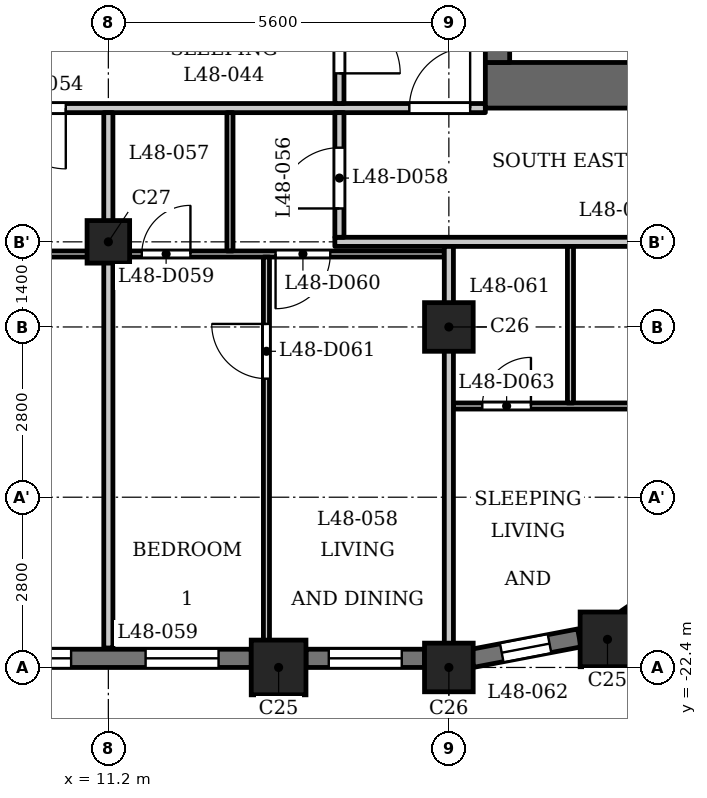
"""IFC4 building model, lengths in metres.
Left out: names, types, materials, properties, quantities, classifications, styles, units other than length and angle.
Written with IfcOpenShell. Run it as: python <this file> out.ifc"""

import sys

from ifc_helpers import new_model, si_unit, direction, frame, frame_2d, origin, origin_2d, place, context, subcontext, project, spatial, rectangle, extrude, element, fill, save


model = new_model("IFC4")
c1 = context("Model", 3, precision=1e-05, world=origin(), true_north=direction((0.0, 1.0)))
c2 = subcontext(c1, "Body", "Model", "MODEL_VIEW")
j1 = project(units=[si_unit("LENGTHUNIT", "METRE"), si_unit("PLANEANGLEUNIT", "RADIAN")], contexts=[c1])
p1 = place(None, origin())
s1 = spatial("IfcSite", under=j1, at=p1, CompositionType="ELEMENT")
p2 = place(p1, origin())
s2 = spatial("IfcBuilding", under=s1, at=p2, CompositionType="ELEMENT")
p3 = place(p2, frame((0.0, 0.0, 188.9)))
s3 = spatial("IfcBuildingStorey", under=s2, at=p3, CompositionType="ELEMENT", Elevation=188.9)
for number, where, z_axis, x_axis in (
    (1, (14.0, -22.4, 0.0), (0.0, 0.0, 1.0), (1.0, 0.0, 0.0)),
    (2, (19.409, -21.938, 0.0), (0.0, 0.0, 1.0), (1.0, 0.0, 0.0)),
):
    element("IfcColumn", number, at=place(p3, frame(where, z_axis=z_axis, x_axis=x_axis)), inside=s3, PredefinedType="COLUMN", context=c2, shape_type="SweptSolid", body=[
        extrude(rectangle(XDim=0.9, YDim=0.9, at=origin_2d()), origin(), (0.0, 0.0, 1.0), 3.5),
    ])
for number, where, z_axis, x_axis in (
    (3, (16.8, -22.4, 0.0), (0.0, 0.0, 1.0), (1.0, 0.0, 0.0)),
    (4, (16.8, -16.8, 0.0), (0.0, 0.0, 1.0), (1.0, 0.0, 0.0)),
):
    element("IfcColumn", number, at=place(p3, frame(where, z_axis=z_axis, x_axis=x_axis)), inside=s3, PredefinedType="COLUMN", context=c2, shape_type="SweptSolid", body=[
        extrude(rectangle(XDim=0.8, YDim=0.8, at=origin_2d()), origin(), (0.0, 0.0, 1.0), 3.5),
    ])
p4 = place(p3, frame((11.2, -15.4, 0.0), z_axis=(0.0, 0.0, 1.0), x_axis=(1.0, 0.0, 0.0)))
e5 = element("IfcColumn", 5, at=p4, inside=s3, PredefinedType="COLUMN", context=c2, shape_type="SweptSolid", body=[
    extrude(rectangle(XDim=0.7, YDim=0.7, at=origin_2d()), origin(), (0.0, 0.0, 1.0), 3.5),
])
p5 = place(p3, frame((8.85, -22.25, 0.0), z_axis=(0.0, 0.0, 1.0), x_axis=(1.0, 0.0, 0.0)))
e6 = element("IfcWall", 6, at=p5, inside=s3, PredefinedType="SOLIDWALL", context=c2, shape_type="SweptSolid", body=[
    extrude(rectangle(XDim=4.7, YDim=0.3, at=frame_2d((2.35, 0.0))), origin(), (0.0, 0.0, 1.0), 2.5),
])
p6 = place(p5, frame((0.538, 0.0, 0.6)))
e7 = element("IfcOpeningElement", 7, at=p6, cuts=e6, PredefinedType="OPENING", context=c2, shape_type="SweptSolid", body=[
    extrude(rectangle(XDim=1.2, YDim=1.55, at=frame_2d((0.6, 0.775))), frame((0.0, 0.16, 0.0), z_axis=(0.0, -1.0, 0.0), x_axis=(1.0, 0.0, 0.0)), (0.0, 0.0, 1.0), 0.32),
])
p7 = place(p5, frame((2.962, 0.0, 0.6)))
e8 = element("IfcOpeningElement", 8, at=p7, cuts=e6, PredefinedType="OPENING", context=c2, shape_type="SweptSolid", body=[
    extrude(rectangle(XDim=1.2, YDim=1.55, at=frame_2d((0.6, 0.775))), frame((0.0, 0.16, 0.0), z_axis=(0.0, -1.0, 0.0), x_axis=(1.0, 0.0, 0.0)), (0.0, 0.0, 1.0), 0.32),
])
p8 = place(p3, frame((14.45, -22.25, 0.0), z_axis=(0.0, 0.0, 1.0), x_axis=(1.0, 0.0, 0.0)))
e9 = element("IfcWall", 9, at=p8, inside=s3, PredefinedType="SOLIDWALL", context=c2, shape_type="SweptSolid", body=[
    extrude(rectangle(XDim=1.95, YDim=0.3, at=frame_2d((0.975, 0.0))), origin(), (0.0, 0.0, 1.0), 2.5),
])
p9 = place(p8, frame((0.375, 0.0, 0.6)))
e10 = element("IfcOpeningElement", 10, at=p9, cuts=e9, PredefinedType="OPENING", context=c2, shape_type="SweptSolid", body=[
    extrude(rectangle(XDim=1.2, YDim=1.55, at=frame_2d((0.6, 0.775))), frame((0.0, 0.16, 0.0), z_axis=(0.0, -1.0, 0.0), x_axis=(1.0, 0.0, 0.0)), (0.0, 0.0, 1.0), 0.32),
])
p10 = place(p3, frame((17.179, -22.251, 0.0), z_axis=(0.0, 0.0, 1.0), x_axis=(0.98230529033, 0.187286722942, 0.0)))
e11 = element("IfcWall", 11, at=p10, inside=s3, PredefinedType="SOLIDWALL", context=c2, shape_type="SweptSolid", body=[
    extrude(rectangle(XDim=1.799, YDim=0.3, at=frame_2d((0.899, 0.0))), origin(), (0.0, 0.0, 1.0), 2.5),
])
p11 = place(p10, frame((0.5, 0.0, 0.6)))
e12 = element("IfcOpeningElement", 12, at=p11, cuts=e11, PredefinedType="OPENING", context=c2, shape_type="SweptSolid", body=[
    extrude(rectangle(XDim=0.8, YDim=1.55, at=frame_2d((0.4, 0.775))), frame((0.0, 0.16, 0.0), z_axis=(0.0, -1.0, 0.0), x_axis=(1.0, 0.0, 0.0)), (0.0, 0.0, 1.0), 0.32),
])
p12 = place(p3, frame((19.719, -21.594, 0.0), z_axis=(0.0, 0.0, 1.0), x_axis=(0.827067282455, 0.562102935673, 0.0)))
e13 = element("IfcWall", 13, at=p12, inside=s3, PredefinedType="SOLIDWALL", context=c2, shape_type="SweptSolid", body=[
    extrude(rectangle(XDim=1.806, YDim=0.3, at=frame_2d((0.903, 0.0))), origin(), (0.0, 0.0, 1.0), 2.5),
])
p13 = place(p12, frame((0.503, 0.0, 0.6)))
e14 = element("IfcOpeningElement", 14, at=p13, cuts=e13, PredefinedType="OPENING", context=c2, shape_type="SweptSolid", body=[
    extrude(rectangle(XDim=0.8, YDim=1.55, at=frame_2d((0.4, 0.775))), frame((0.0, 0.16, 0.0), z_axis=(0.0, -1.0, 0.0), x_axis=(1.0, 0.0, 0.0)), (0.0, 0.0, 1.0), 0.32),
])
p14 = place(p3, frame((17.4, -12.825, 0.0), z_axis=(0.0, 0.0, 1.0), x_axis=(1.0, 0.0, 0.0)))
e15 = element("IfcWall", 15, at=p14, inside=s3, PredefinedType="SHEAR", context=c2, shape_type="SweptSolid", body=[
    extrude(rectangle(XDim=7.6, YDim=0.75, at=frame_2d((3.8, 0.0))), origin(), (0.0, 0.0, 1.0), 3.2),
])
p15 = place(p3, frame((17.6, -12.45, 0.0), z_axis=(0.0, 0.0, 1.0), x_axis=(0.0, 1.0, 0.0)))
e16 = element("IfcWall", 16, at=p15, inside=s3, PredefinedType="SHEAR", context=c2, shape_type="SweptSolid", body=[
    extrude(rectangle(XDim=24.9, YDim=0.4, at=frame_2d((12.45, 0.0))), origin(), (0.0, 0.0, 1.0), 3.2),
])
p16 = place(p15, frame((6.325, 0.0, 0.0)))
e17 = element("IfcOpeningElement", 17, at=p16, cuts=e16, PredefinedType="OPENING", context=c2, shape_type="SweptSolid", body=[
    extrude(rectangle(XDim=0.9, YDim=2.1, at=frame_2d((0.45, 1.05))), frame((0.0, 0.21, 0.0), z_axis=(0.0, -1.0, 0.0), x_axis=(1.0, 0.0, 0.0)), (0.0, 0.0, 1.0), 0.42),
])
p17 = place(p15, frame((9.925, 0.0, 0.0)))
e18 = element("IfcOpeningElement", 18, at=p17, cuts=e16, PredefinedType="OPENING", context=c2, shape_type="SweptSolid", body=[
    extrude(rectangle(XDim=0.9, YDim=2.1, at=frame_2d((0.45, 1.05))), frame((0.0, 0.21, 0.0), z_axis=(0.0, -1.0, 0.0), x_axis=(1.0, 0.0, 0.0)), (0.0, 0.0, 1.0), 0.42),
])
p18 = place(p15, frame((15.6, 0.0, 0.0)))
e19 = element("IfcOpeningElement", 19, at=p18, cuts=e16, PredefinedType="OPENING", context=c2, shape_type="SweptSolid", body=[
    extrude(rectangle(XDim=1.1, YDim=2.1, at=frame_2d((0.55, 1.05))), frame((0.0, 0.21, 0.0), z_axis=(0.0, -1.0, 0.0), x_axis=(1.0, 0.0, 0.0)), (0.0, 0.0, 1.0), 0.42),
])
p19 = place(p15, frame((18.0, 0.0, 0.0)))
e20 = element("IfcOpeningElement", 20, at=p19, cuts=e16, PredefinedType="OPENING", context=c2, shape_type="SweptSolid", body=[
    extrude(rectangle(XDim=1.1, YDim=2.1, at=frame_2d((0.55, 1.05))), frame((0.0, 0.21, 0.0), z_axis=(0.0, -1.0, 0.0), x_axis=(1.0, 0.0, 0.0)), (0.0, 0.0, 1.0), 0.42),
])
p20 = place(p15, frame((23.025, 0.0, 0.0)))
e21 = element("IfcOpeningElement", 21, at=p20, cuts=e16, PredefinedType="OPENING", context=c2, shape_type="SweptSolid", body=[
    extrude(rectangle(XDim=1.1, YDim=2.1, at=frame_2d((0.55, 1.05))), frame((0.0, 0.21, 0.0), z_axis=(0.0, -1.0, 0.0), x_axis=(1.0, 0.0, 0.0)), (0.0, 0.0, 1.0), 0.42),
])
p21 = place(p15, frame((0.775, 0.0, 0.0)))
e22 = element("IfcOpeningElement", 22, at=p21, cuts=e16, PredefinedType="OPENING", context=c2, shape_type="SweptSolid", body=[
    extrude(rectangle(XDim=1.1, YDim=2.1, at=frame_2d((0.55, 1.05))), frame((0.0, 0.21, 0.0), z_axis=(0.0, -1.0, 0.0), x_axis=(1.0, 0.0, 0.0)), (0.0, 0.0, 1.0), 0.42),
])
p22 = place(p15, frame((12.925, 0.0, 0.0)))
e23 = element("IfcOpeningElement", 23, at=p22, cuts=e16, PredefinedType="OPENING", context=c2, shape_type="SweptSolid", body=[
    extrude(rectangle(XDim=1.8, YDim=2.1, at=frame_2d((0.9, 1.05))), frame((0.0, 0.21, 0.0), z_axis=(0.0, -1.0, 0.0), x_axis=(1.0, 0.0, 0.0)), (0.0, 0.0, 1.0), 0.42),
])
p23 = place(p3, frame((16.875, -18.1, 0.0), z_axis=(0.0, 0.0, 1.0), x_axis=(1.0, 0.0, 0.0)))
e24 = element("IfcWall", 24, at=p23, inside=s3, PredefinedType="PARTITIONING", context=c2, shape_type="SweptSolid", body=[
    extrude(rectangle(XDim=6.765, YDim=0.1, at=frame_2d((3.382, 0.0))), origin(), (0.0, 0.0, 1.0), 3.2),
])
p24 = place(p23, frame((0.475, 0.0, 0.0)))
e25 = element("IfcOpeningElement", 25, at=p24, cuts=e24, PredefinedType="OPENING", context=c2, shape_type="SweptSolid", body=[
    extrude(rectangle(XDim=0.8, YDim=2.1, at=frame_2d((0.4, 1.05))), frame((0.0, 0.06, 0.0), z_axis=(0.0, -1.0, 0.0), x_axis=(1.0, 0.0, 0.0)), (0.0, 0.0, 1.0), 0.12),
])
p25 = place(p23, frame((4.575, 0.0, 0.0)))
e26 = element("IfcOpeningElement", 26, at=p25, cuts=e24, PredefinedType="OPENING", context=c2, shape_type="SweptSolid", body=[
    extrude(rectangle(XDim=0.9, YDim=2.1, at=frame_2d((0.45, 1.05))), frame((0.0, 0.06, 0.0), z_axis=(0.0, -1.0, 0.0), x_axis=(1.0, 0.0, 0.0)), (0.0, 0.0, 1.0), 0.12),
])
p26 = place(p3, frame((-16.725, -15.6, 0.0), z_axis=(0.0, 0.0, 1.0), x_axis=(1.0, 0.0, 0.0)))
e27 = element("IfcWall", 27, at=p26, inside=s3, PredefinedType="PARTITIONING", context=c2, shape_type="SweptSolid", body=[
    extrude(rectangle(XDim=33.45, YDim=0.1, at=frame_2d((16.725, 0.0))), origin(), (0.0, 0.0, 1.0), 3.2),
])
p27 = place(p26, frame((4.075, 0.0, 0.0)))
e28 = element("IfcOpeningElement", 28, at=p27, cuts=e27, PredefinedType="OPENING", context=c2, shape_type="SweptSolid", body=[
    extrude(rectangle(XDim=0.8, YDim=2.1, at=frame_2d((0.4, 1.05))), frame((0.0, 0.06, 0.0), z_axis=(0.0, -1.0, 0.0), x_axis=(1.0, 0.0, 0.0)), (0.0, 0.0, 1.0), 0.12),
])
p28 = place(p26, frame((1.825, 0.0, 0.0)))
e29 = element("IfcOpeningElement", 29, at=p28, cuts=e27, PredefinedType="OPENING", context=c2, shape_type="SweptSolid", body=[
    extrude(rectangle(XDim=0.9, YDim=2.1, at=frame_2d((0.45, 1.05))), frame((0.0, 0.06, 0.0), z_axis=(0.0, -1.0, 0.0), x_axis=(1.0, 0.0, 0.0)), (0.0, 0.0, 1.0), 0.12),
])
p29 = place(p26, frame((9.675, 0.0, 0.0)))
e30 = element("IfcOpeningElement", 30, at=p29, cuts=e27, PredefinedType="OPENING", context=c2, shape_type="SweptSolid", body=[
    extrude(rectangle(XDim=0.8, YDim=2.1, at=frame_2d((0.4, 1.05))), frame((0.0, 0.06, 0.0), z_axis=(0.0, -1.0, 0.0), x_axis=(1.0, 0.0, 0.0)), (0.0, 0.0, 1.0), 0.12),
])
p30 = place(p26, frame((14.025, 0.0, 0.0)))
e31 = element("IfcOpeningElement", 31, at=p30, cuts=e27, PredefinedType="OPENING", context=c2, shape_type="SweptSolid", body=[
    extrude(rectangle(XDim=0.9, YDim=2.1, at=frame_2d((0.45, 1.05))), frame((0.0, 0.06, 0.0), z_axis=(0.0, -1.0, 0.0), x_axis=(1.0, 0.0, 0.0)), (0.0, 0.0, 1.0), 0.12),
])
p31 = place(p26, frame((20.875, 0.0, 0.0)))
e32 = element("IfcOpeningElement", 32, at=p31, cuts=e27, PredefinedType="OPENING", context=c2, shape_type="SweptSolid", body=[
    extrude(rectangle(XDim=0.8, YDim=2.1, at=frame_2d((0.4, 1.05))), frame((0.0, 0.06, 0.0), z_axis=(0.0, -1.0, 0.0), x_axis=(1.0, 0.0, 0.0)), (0.0, 0.0, 1.0), 0.12),
])
p32 = place(p26, frame((25.225, 0.0, 0.0)))
e33 = element("IfcOpeningElement", 33, at=p32, cuts=e27, PredefinedType="OPENING", context=c2, shape_type="SweptSolid", body=[
    extrude(rectangle(XDim=0.9, YDim=2.1, at=frame_2d((0.45, 1.05))), frame((0.0, 0.06, 0.0), z_axis=(0.0, -1.0, 0.0), x_axis=(1.0, 0.0, 0.0)), (0.0, 0.0, 1.0), 0.12),
])
p33 = place(p26, frame((28.475, 0.0, 0.0)))
e34 = element("IfcOpeningElement", 34, at=p33, cuts=e27, PredefinedType="OPENING", context=c2, shape_type="SweptSolid", body=[
    extrude(rectangle(XDim=0.8, YDim=2.1, at=frame_2d((0.4, 1.05))), frame((0.0, 0.06, 0.0), z_axis=(0.0, -1.0, 0.0), x_axis=(1.0, 0.0, 0.0)), (0.0, 0.0, 1.0), 0.12),
])
p34 = place(p26, frame((30.675, 0.0, 0.0)))
e35 = element("IfcOpeningElement", 35, at=p34, cuts=e27, PredefinedType="OPENING", context=c2, shape_type="SweptSolid", body=[
    extrude(rectangle(XDim=0.9, YDim=2.1, at=frame_2d((0.45, 1.05))), frame((0.0, 0.06, 0.0), z_axis=(0.0, -1.0, 0.0), x_axis=(1.0, 0.0, 0.0)), (0.0, 0.0, 1.0), 0.12),
])
p35 = place(p3, frame((14.925, -15.4, 0.0), z_axis=(0.0, 0.0, 1.0), x_axis=(1.0, 0.0, 0.0)))
e36 = element("IfcWall", 36, at=p35, inside=s3, PredefinedType="PARTITIONING", context=c2, shape_type="SweptSolid", body=[
    extrude(rectangle(XDim=9.759, YDim=0.15, at=frame_2d((4.879, 0.0))), origin(), (0.0, 0.0, 1.0), 3.2),
])
p36 = place(p35, frame((7.775, 0.0, 0.0)))
e37 = element("IfcOpeningElement", 37, at=p36, cuts=e36, PredefinedType="OPENING", context=c2, shape_type="SweptSolid", body=[
    extrude(rectangle(XDim=1.0, YDim=2.1, at=frame_2d((0.5, 1.05))), frame((0.0, 0.085, 0.0), z_axis=(0.0, -1.0, 0.0), x_axis=(1.0, 0.0, 0.0)), (0.0, 0.0, 1.0), 0.17),
])
p37 = place(p3, frame((-17.4, -13.2, 0.0), z_axis=(0.0, 0.0, 1.0), x_axis=(1.0, 0.0, 0.0)))
e38 = element("IfcWall", 38, at=p37, inside=s3, PredefinedType="PARTITIONING", context=c2, shape_type="SweptSolid", body=[
    extrude(rectangle(XDim=34.8, YDim=0.15, at=frame_2d((17.4, 0.0))), origin(), (0.0, 0.0, 1.0), 3.2),
])
p38 = place(p37, frame((0.15, 0.0, 0.0)))
e39 = element("IfcOpeningElement", 39, at=p38, cuts=e38, PredefinedType="OPENING", context=c2, shape_type="SweptSolid", body=[
    extrude(rectangle(XDim=1.0, YDim=2.1, at=frame_2d((0.5, 1.05))), frame((0.0, 0.085, 0.0), z_axis=(0.0, -1.0, 0.0), x_axis=(1.0, 0.0, 0.0)), (0.0, 0.0, 1.0), 0.17),
])
p39 = place(p37, frame((33.55, 0.0, 0.0)))
e40 = element("IfcOpeningElement", 40, at=p39, cuts=e38, PredefinedType="OPENING", context=c2, shape_type="SweptSolid", body=[
    extrude(rectangle(XDim=1.0, YDim=2.1, at=frame_2d((0.5, 1.05))), frame((0.0, 0.085, 0.0), z_axis=(0.0, -1.0, 0.0), x_axis=(1.0, 0.0, 0.0)), (0.0, 0.0, 1.0), 0.17),
])
p40 = place(p37, frame((15.7, 0.0, 0.0)))
e41 = element("IfcOpeningElement", 41, at=p40, cuts=e38, PredefinedType="OPENING", context=c2, shape_type="SweptSolid", body=[
    extrude(rectangle(XDim=1.0, YDim=2.1, at=frame_2d((0.5, 1.05))), frame((0.0, 0.085, 0.0), z_axis=(0.0, -1.0, 0.0), x_axis=(1.0, 0.0, 0.0)), (0.0, 0.0, 1.0), 0.17),
])
p41 = place(p37, frame((26.9, 0.0, 0.0)))
e42 = element("IfcOpeningElement", 42, at=p41, cuts=e38, PredefinedType="OPENING", context=c2, shape_type="SweptSolid", body=[
    extrude(rectangle(XDim=1.0, YDim=2.1, at=frame_2d((0.5, 1.05))), frame((0.0, 0.085, 0.0), z_axis=(0.0, -1.0, 0.0), x_axis=(1.0, 0.0, 0.0)), (0.0, 0.0, 1.0), 0.17),
])
p42 = place(p3, frame((11.2, -22.08, 0.0), z_axis=(0.0, 0.0, 1.0), x_axis=(0.0, 1.0, 0.0)))
e43 = element("IfcWall", 43, at=p42, inside=s3, PredefinedType="PARTITIONING", context=c2, shape_type="SweptSolid", body=[
    extrude(rectangle(XDim=6.43, YDim=0.15, at=frame_2d((3.215, 0.0))), origin(), (0.0, 0.0, 1.0), 3.2),
])
p43 = place(p3, frame((11.2, -15.55, 0.0), z_axis=(0.0, 0.0, 1.0), x_axis=(0.0, 1.0, 0.0)))
e44 = element("IfcWall", 44, at=p43, inside=s3, PredefinedType="PARTITIONING", context=c2, shape_type="SweptSolid", body=[
    extrude(rectangle(XDim=2.275, YDim=0.15, at=frame_2d((1.138, 0.0))), origin(), (0.0, 0.0, 1.0), 3.2),
])
p44 = place(p3, frame((13.2, -15.55, 0.0), z_axis=(0.0, 0.0, 1.0), x_axis=(0.0, 1.0, 0.0)))
e45 = element("IfcWall", 45, at=p44, inside=s3, PredefinedType="PARTITIONING", context=c2, shape_type="SweptSolid", body=[
    extrude(rectangle(XDim=2.275, YDim=0.1, at=frame_2d((1.138, 0.0))), origin(), (0.0, 0.0, 1.0), 3.2),
])
p45 = place(p3, frame((13.8, -22.83, 0.0), z_axis=(0.0, 0.0, 1.0), x_axis=(0.0, 1.0, 0.0)))
e46 = element("IfcWall", 46, at=p45, inside=s3, PredefinedType="PARTITIONING", context=c2, shape_type="SweptSolid", body=[
    extrude(rectangle(XDim=7.18, YDim=0.1, at=frame_2d((3.59, 0.0))), origin(), (0.0, 0.0, 1.0), 3.2),
])
p46 = place(p45, frame((5.18, 0.0, 0.0)))
e47 = element("IfcOpeningElement", 47, at=p46, cuts=e46, PredefinedType="OPENING", context=c2, shape_type="SweptSolid", body=[
    extrude(rectangle(XDim=0.9, YDim=2.1, at=frame_2d((0.45, 1.05))), frame((0.0, 0.06, 0.0), z_axis=(0.0, -1.0, 0.0), x_axis=(1.0, 0.0, 0.0)), (0.0, 0.0, 1.0), 0.12),
])
p47 = place(p3, frame((15.0, -15.325, 0.0), z_axis=(0.0, 0.0, 1.0), x_axis=(0.0, 1.0, 0.0)))
e48 = element("IfcWall", 48, at=p47, inside=s3, PredefinedType="PARTITIONING", context=c2, shape_type="SweptSolid", body=[
    extrude(rectangle(XDim=2.05, YDim=0.15, at=frame_2d((1.025, 0.0))), origin(), (0.0, 0.0, 1.0), 3.2),
])
p48 = place(p47, frame((0.474, 0.0, 0.0)))
e49 = element("IfcOpeningElement", 49, at=p48, cuts=e48, PredefinedType="OPENING", context=c2, shape_type="SweptSolid", body=[
    extrude(rectangle(XDim=1.0, YDim=2.1, at=frame_2d((0.5, 1.05))), frame((0.0, 0.085, 0.0), z_axis=(0.0, -1.0, 0.0), x_axis=(1.0, 0.0, 0.0)), (0.0, 0.0, 1.0), 0.17),
])
p49 = place(p3, frame((15.0, -13.125, 0.0), z_axis=(0.0, 0.0, 1.0), x_axis=(0.0, 1.0, 0.0)))
e50 = element("IfcWall", 50, at=p49, inside=s3, PredefinedType="PARTITIONING", context=c2, shape_type="SweptSolid", body=[
    extrude(rectangle(XDim=6.356, YDim=0.15, at=frame_2d((3.178, 0.0))), origin(), (0.0, 0.0, 1.0), 3.2),
])
p50 = place(p49, frame((0.496, 0.0, 0.0)))
e51 = element("IfcOpeningElement", 51, at=p50, cuts=e50, PredefinedType="OPENING", context=c2, shape_type="SweptSolid", body=[
    extrude(rectangle(XDim=1.0, YDim=2.1, at=frame_2d((0.5, 1.05))), frame((0.0, 0.085, 0.0), z_axis=(0.0, -1.0, 0.0), x_axis=(1.0, 0.0, 0.0)), (0.0, 0.0, 1.0), 0.17),
])
p51 = place(p3, frame((16.8, -22.31, 0.0), z_axis=(0.0, 0.0, 1.0), x_axis=(0.0, 1.0, 0.0)))
e52 = element("IfcWall", 52, at=p51, inside=s3, PredefinedType="PARTITIONING", context=c2, shape_type="SweptSolid", body=[
    extrude(rectangle(XDim=6.835, YDim=0.15, at=frame_2d((3.417, 0.0))), origin(), (0.0, 0.0, 1.0), 2.55),
])
p52 = place(p3, frame((18.8, -18.05, 0.0), z_axis=(0.0, 0.0, 1.0), x_axis=(0.0, 1.0, 0.0)))
e53 = element("IfcWall", 53, at=p52, inside=s3, PredefinedType="PARTITIONING", context=c2, shape_type="SweptSolid", body=[
    extrude(rectangle(XDim=2.575, YDim=0.1, at=frame_2d((1.288, 0.0))), origin(), (0.0, 0.0, 1.0), 3.2),
])
p53 = place(p50, origin())
e54 = element("IfcDoor", 54, at=p53, inside=s3, OperationType="SINGLE_SWING_LEFT", PredefinedType="DOOR", context=c2, shape_type="SweptSolid", body=[
    extrude(rectangle(XDim=1.0, YDim=2.1, at=frame_2d((0.5, 1.05))), frame((0.0, 0.025, 0.0), z_axis=(0.0, -1.0, 0.0), x_axis=(1.0, 0.0, 0.0)), (0.0, 0.0, 1.0), 0.05),
])
fill(e51, e54)
p54 = place(p39, origin())
e55 = element("IfcDoor", 55, at=p54, inside=s3, OperationType="SINGLE_SWING_LEFT", PredefinedType="DOOR", context=c2, shape_type="SweptSolid", body=[
    extrude(rectangle(XDim=1.0, YDim=2.1, at=frame_2d((0.5, 1.05))), frame((0.0, 0.025, 0.0), z_axis=(0.0, -1.0, 0.0), x_axis=(1.0, 0.0, 0.0)), (0.0, 0.0, 1.0), 0.05),
])
fill(e40, e55)
p55 = place(p41, origin())
e56 = element("IfcDoor", 56, at=p55, inside=s3, OperationType="SINGLE_SWING_RIGHT", PredefinedType="DOOR", context=c2, shape_type="SweptSolid", body=[
    extrude(rectangle(XDim=1.0, YDim=2.1, at=frame_2d((0.5, 1.05))), frame((0.0, 0.025, 0.0), z_axis=(0.0, -1.0, 0.0), x_axis=(1.0, 0.0, 0.0)), (0.0, 0.0, 1.0), 0.05),
])
fill(e42, e56)
p56 = place(p48, origin())
e57 = element("IfcDoor", 57, at=p56, inside=s3, OperationType="SINGLE_SWING_RIGHT", PredefinedType="DOOR", context=c2, shape_type="SweptSolid", body=[
    extrude(rectangle(XDim=1.0, YDim=2.1, at=frame_2d((0.5, 1.05))), frame((0.0, 0.025, 0.0), z_axis=(0.0, -1.0, 0.0), x_axis=(1.0, 0.0, 0.0)), (0.0, 0.0, 1.0), 0.05),
])
fill(e49, e57)
p57 = place(p33, origin())
e58 = element("IfcDoor", 58, at=p57, inside=s3, OperationType="SINGLE_SWING_LEFT", PredefinedType="DOOR", context=c2, shape_type="SweptSolid", body=[
    extrude(rectangle(XDim=0.8, YDim=2.1, at=frame_2d((0.4, 1.05))), frame((0.0, 0.025, 0.0), z_axis=(0.0, -1.0, 0.0), x_axis=(1.0, 0.0, 0.0)), (0.0, 0.0, 1.0), 0.05),
])
fill(e34, e58)
p58 = place(p34, origin())
e59 = element("IfcDoor", 59, at=p58, inside=s3, OperationType="SINGLE_SWING_LEFT", PredefinedType="DOOR", context=c2, shape_type="SweptSolid", body=[
    extrude(rectangle(XDim=0.9, YDim=2.1, at=frame_2d((0.45, 1.05))), frame((0.0, 0.025, 0.0), z_axis=(0.0, -1.0, 0.0), x_axis=(1.0, 0.0, 0.0)), (0.0, 0.0, 1.0), 0.05),
])
fill(e35, e59)
p59 = place(p46, origin())
e60 = element("IfcDoor", 60, at=p59, inside=s3, OperationType="SINGLE_SWING_LEFT", PredefinedType="DOOR", context=c2, shape_type="SweptSolid", body=[
    extrude(rectangle(XDim=0.9, YDim=2.1, at=frame_2d((0.45, 1.05))), frame((0.0, 0.025, 0.0), z_axis=(0.0, -1.0, 0.0), x_axis=(1.0, 0.0, 0.0)), (0.0, 0.0, 1.0), 0.05),
])
fill(e47, e60)
p60 = place(p24, origin())
e61 = element("IfcDoor", 61, at=p60, inside=s3, OperationType="SINGLE_SWING_LEFT", PredefinedType="DOOR", context=c2, shape_type="SweptSolid", body=[
    extrude(rectangle(XDim=0.8, YDim=2.1, at=frame_2d((0.4, 1.05))), frame((0.0, 0.025, 0.0), z_axis=(0.0, -1.0, 0.0), x_axis=(1.0, 0.0, 0.0)), (0.0, 0.0, 1.0), 0.05),
])
fill(e25, e61)
p61 = place(p6, origin())
e62 = element("IfcWindow", 62, at=p61, inside=s3, PartitioningType="SINGLE_PANEL", PredefinedType="WINDOW", context=c2, shape_type="SweptSolid", body=[
    extrude(rectangle(XDim=1.2, YDim=1.55, at=frame_2d((0.6, 0.775))), frame((0.0, 0.03, 0.0), z_axis=(0.0, -1.0, 0.0), x_axis=(1.0, 0.0, 0.0)), (0.0, 0.0, 1.0), 0.06),
])
fill(e7, e62)
p62 = place(p7, origin())
e63 = element("IfcWindow", 63, at=p62, inside=s3, PartitioningType="SINGLE_PANEL", PredefinedType="WINDOW", context=c2, shape_type="SweptSolid", body=[
    extrude(rectangle(XDim=1.2, YDim=1.55, at=frame_2d((0.6, 0.775))), frame((0.0, 0.03, 0.0), z_axis=(0.0, -1.0, 0.0), x_axis=(1.0, 0.0, 0.0)), (0.0, 0.0, 1.0), 0.06),
])
fill(e8, e63)
p63 = place(p9, origin())
e64 = element("IfcWindow", 64, at=p63, inside=s3, PartitioningType="SINGLE_PANEL", PredefinedType="WINDOW", context=c2, shape_type="SweptSolid", body=[
    extrude(rectangle(XDim=1.2, YDim=1.55, at=frame_2d((0.6, 0.775))), frame((0.0, 0.03, 0.0), z_axis=(0.0, -1.0, 0.0), x_axis=(1.0, 0.0, 0.0)), (0.0, 0.0, 1.0), 0.06),
])
fill(e10, e64)
p64 = place(p11, origin())
e65 = element("IfcWindow", 65, at=p64, inside=s3, PartitioningType="SINGLE_PANEL", PredefinedType="WINDOW", context=c2, shape_type="SweptSolid", body=[
    extrude(rectangle(XDim=0.8, YDim=1.55, at=frame_2d((0.4, 0.775))), frame((0.0, 0.03, 0.0), z_axis=(0.0, -1.0, 0.0), x_axis=(1.0, 0.0, 0.0)), (0.0, 0.0, 1.0), 0.06),
])
fill(e12, e65)
save(model, sys.argv[1])
